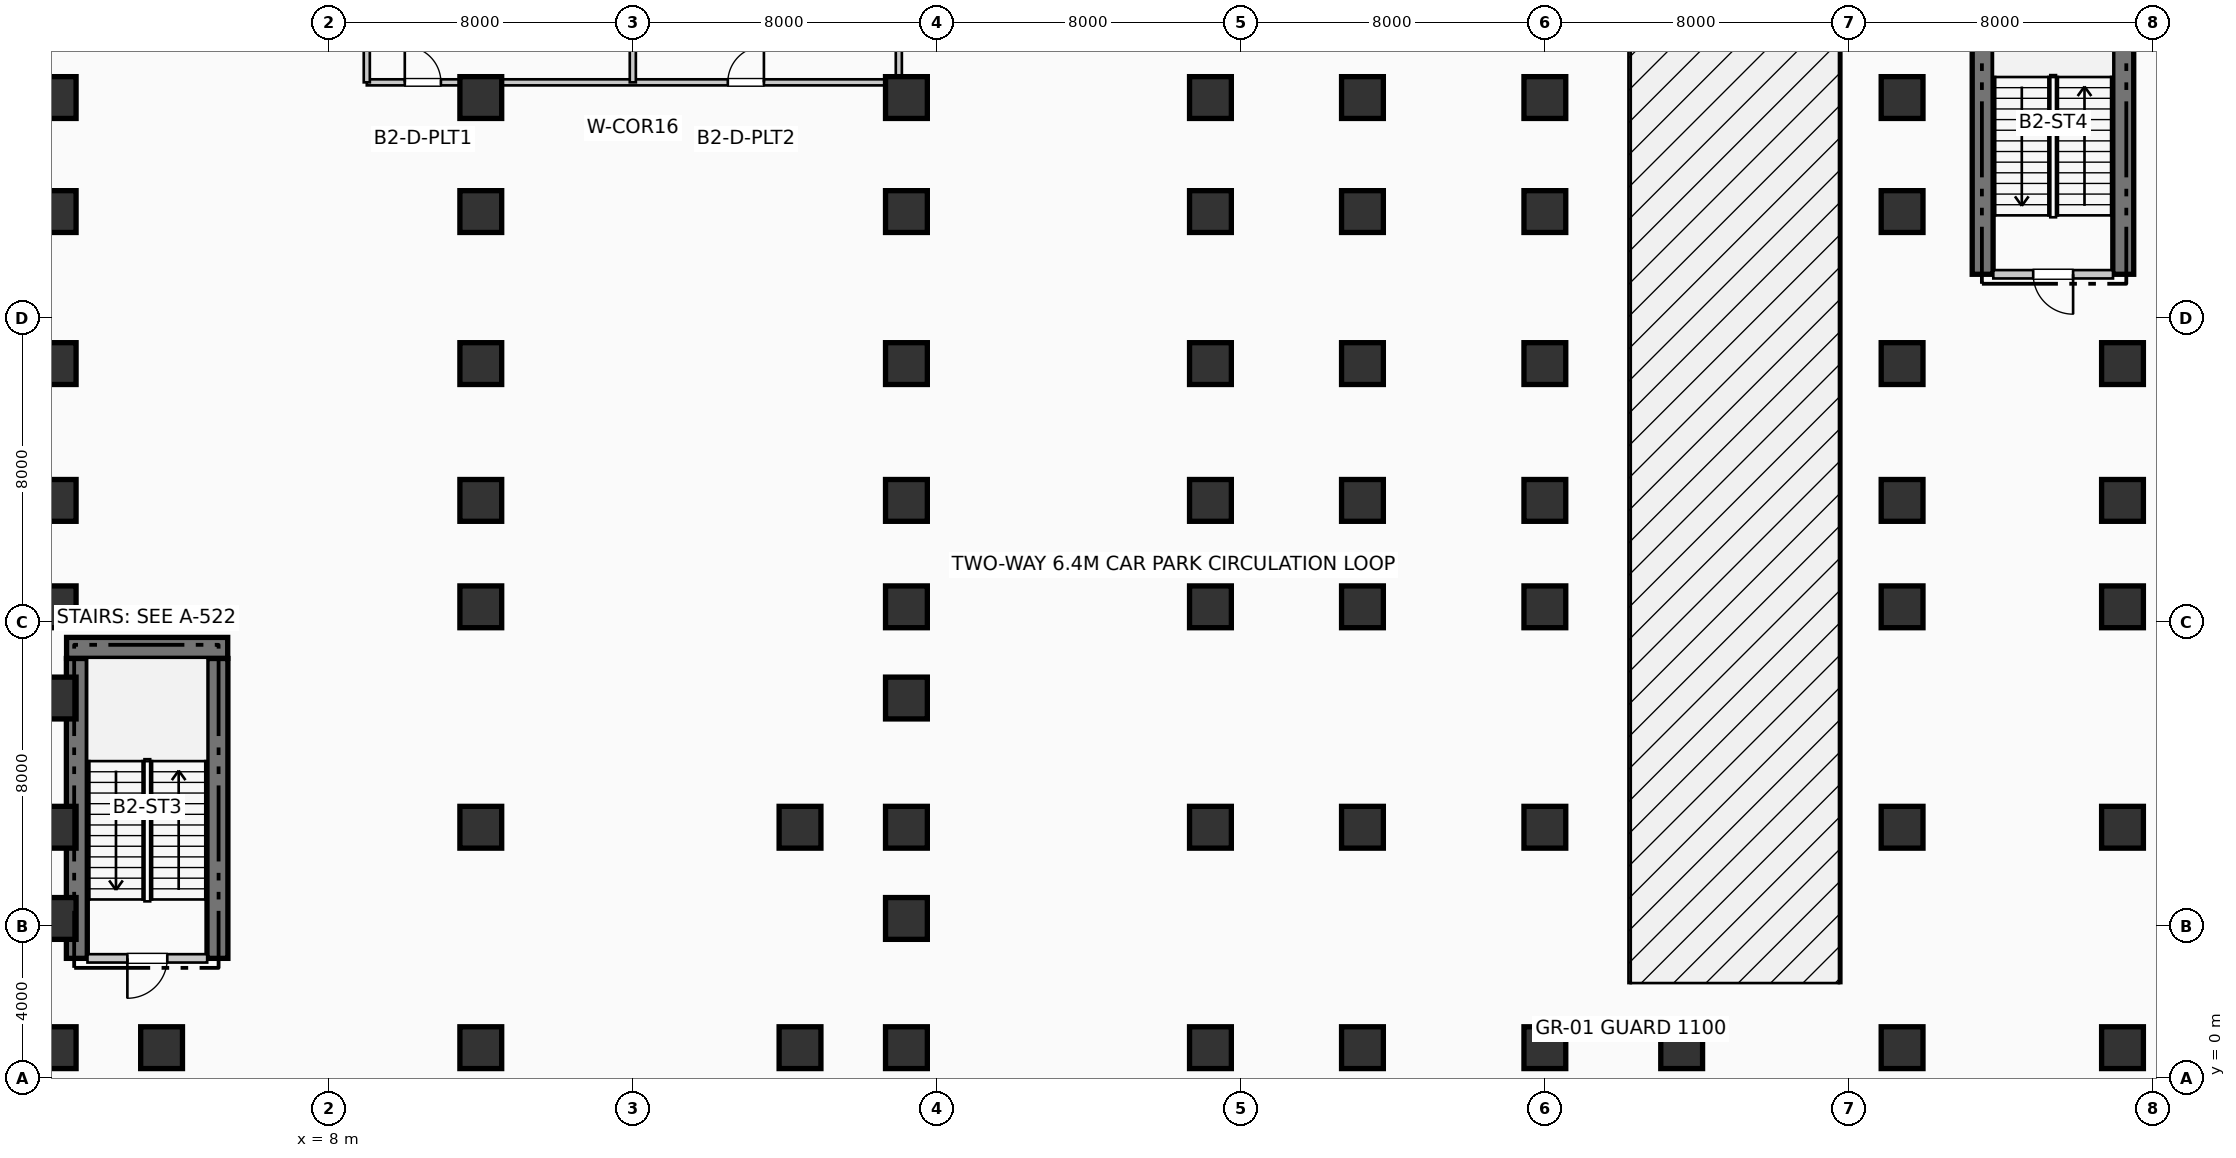
"""IFC4 building model, lengths in metres.
Left out: names, types, materials, properties, quantities, classifications, styles, units other than length and angle.
Written with IfcOpenShell. Run it as: python <this file> out.ifc"""

import sys

from ifc_helpers import new_model, si_unit, direction, frame, frame_2d, origin, origin_2d, place, context, subcontext, project, spatial, rectangle, extrude, element, fill, save


model = new_model("IFC4")
c1 = context("Model", 3, precision=1e-05, world=origin(), true_north=direction((0.0, 1.0)))
c2 = subcontext(c1, "Body", "Model", "MODEL_VIEW")
j1 = project(units=[si_unit("LENGTHUNIT", "METRE"), si_unit("PLANEANGLEUNIT", "RADIAN")], contexts=[c1])
p1 = place(None, origin())
s1 = spatial("IfcSite", under=j1, at=p1, CompositionType="ELEMENT")
p2 = place(p1, origin())
s2 = spatial("IfcBuilding", under=s1, at=p2, CompositionType="ELEMENT")
p3 = place(p2, frame((0.0, 0.0, -9.24)))
s3 = spatial("IfcBuildingStorey", under=s2, at=p3, CompositionType="ELEMENT", Elevation=-9.24)
for number, where, z_axis, x_axis in (
    (1, (1.37, 3.15, 0.0), (0.0, 0.0, 1.0), (0.0, 1.0, 0.0)),
    (2, (5.07, 3.15, 0.0), (0.0, 0.0, 1.0), (0.0, 1.0, 0.0)),
):
    element("IfcWall", number, at=place(p3, frame(where, z_axis=z_axis, x_axis=x_axis)), inside=s3, PredefinedType="SHEAR", context=c2, shape_type="SweptSolid", body=[
        extrude(rectangle(XDim=7.89, YDim=0.55, at=frame_2d((3.945, 0.0))), origin(), (0.0, 0.0, 1.0), 4.62),
    ])
p4 = place(p3, frame((1.1, 11.32, 0.0), z_axis=(0.0, 0.0, 1.0), x_axis=(1.0, 0.0, 0.0)))
e3 = element("IfcWall", 3, at=p4, inside=s3, PredefinedType="SHEAR", context=c2, shape_type="SweptSolid", body=[
    extrude(rectangle(XDim=4.24, YDim=0.55, at=frame_2d((2.12, 0.0))), origin(), (0.0, 0.0, 1.0), 4.62),
])
for number, where, z_axis, x_axis in (
    (4, (51.52, 21.15, 0.0), (0.0, 0.0, 1.0), (0.0, 1.0, 0.0)),
    (5, (55.22, 21.15, 0.0), (0.0, 0.0, 1.0), (0.0, 1.0, 0.0)),
):
    element("IfcWall", number, at=place(p3, frame(where, z_axis=z_axis, x_axis=x_axis)), inside=s3, PredefinedType="SHEAR", context=c2, shape_type="SweptSolid", body=[
        extrude(rectangle(XDim=7.89, YDim=0.55, at=frame_2d((3.945, 0.0))), origin(), (0.0, 0.0, 1.0), 4.62),
    ])
for number, where, z_axis, x_axis in (
    (6, (0.8, 0.8, 0.0), (0.0, 0.0, 1.0), (1.0, 0.0, 0.0)),
    (7, (0.8, 4.2, 0.0), (0.0, 0.0, 1.0), (1.0, 0.0, 0.0)),
    (8, (0.8, 6.6, 0.0), (0.0, 0.0, 1.0), (1.0, 0.0, 0.0)),
    (9, (0.8, 10.0, 0.0), (0.0, 0.0, 1.0), (1.0, 0.0, 0.0)),
    (10, (0.8, 12.4, 0.0), (0.0, 0.0, 1.0), (1.0, 0.0, 0.0)),
    (11, (0.8, 15.2, 0.0), (0.0, 0.0, 1.0), (1.0, 0.0, 0.0)),
    (12, (0.8, 18.8, 0.0), (0.0, 0.0, 1.0), (1.0, 0.0, 0.0)),
    (13, (0.8, 22.8, 0.0), (0.0, 0.0, 1.0), (1.0, 0.0, 0.0)),
    (14, (0.8, 25.8, 0.0), (0.0, 0.0, 1.0), (1.0, 0.0, 0.0)),
    (15, (3.6, 0.8, 0.0), (0.0, 0.0, 1.0), (1.0, 0.0, 0.0)),
    (16, (12.0, 0.8, 0.0), (0.0, 0.0, 1.0), (1.0, 0.0, 0.0)),
    (17, (12.0, 6.6, 0.0), (0.0, 0.0, 1.0), (1.0, 0.0, 0.0)),
    (18, (12.0, 12.4, 0.0), (0.0, 0.0, 1.0), (1.0, 0.0, 0.0)),
    (19, (12.0, 15.2, 0.0), (0.0, 0.0, 1.0), (1.0, 0.0, 0.0)),
    (20, (12.0, 18.8, 0.0), (0.0, 0.0, 1.0), (1.0, 0.0, 0.0)),
    (21, (12.0, 22.8, 0.0), (0.0, 0.0, 1.0), (1.0, 0.0, 0.0)),
    (22, (12.0, 25.8, 0.0), (0.0, 0.0, 1.0), (1.0, 0.0, 0.0)),
    (23, (20.4, 0.8, 0.0), (0.0, 0.0, 1.0), (1.0, 0.0, 0.0)),
    (24, (20.4, 6.6, 0.0), (0.0, 0.0, 1.0), (1.0, 0.0, 0.0)),
    (25, (23.2, 0.8, 0.0), (0.0, 0.0, 1.0), (1.0, 0.0, 0.0)),
    (26, (23.2, 4.2, 0.0), (0.0, 0.0, 1.0), (1.0, 0.0, 0.0)),
    (27, (23.2, 6.6, 0.0), (0.0, 0.0, 1.0), (1.0, 0.0, 0.0)),
    (28, (23.2, 10.0, 0.0), (0.0, 0.0, 1.0), (1.0, 0.0, 0.0)),
    (29, (23.2, 12.4, 0.0), (0.0, 0.0, 1.0), (1.0, 0.0, 0.0)),
    (30, (23.2, 15.2, 0.0), (0.0, 0.0, 1.0), (1.0, 0.0, 0.0)),
    (31, (23.2, 18.8, 0.0), (0.0, 0.0, 1.0), (1.0, 0.0, 0.0)),
    (32, (23.2, 22.8, 0.0), (0.0, 0.0, 1.0), (1.0, 0.0, 0.0)),
    (33, (23.2, 25.8, 0.0), (0.0, 0.0, 1.0), (1.0, 0.0, 0.0)),
    (34, (31.2, 0.8, 0.0), (0.0, 0.0, 1.0), (1.0, 0.0, 0.0)),
    (35, (31.2, 6.6, 0.0), (0.0, 0.0, 1.0), (1.0, 0.0, 0.0)),
    (36, (31.2, 12.4, 0.0), (0.0, 0.0, 1.0), (1.0, 0.0, 0.0)),
    (37, (31.2, 15.2, 0.0), (0.0, 0.0, 1.0), (1.0, 0.0, 0.0)),
    (38, (31.2, 18.8, 0.0), (0.0, 0.0, 1.0), (1.0, 0.0, 0.0)),
    (39, (31.2, 22.8, 0.0), (0.0, 0.0, 1.0), (1.0, 0.0, 0.0)),
    (40, (31.2, 25.8, 0.0), (0.0, 0.0, 1.0), (1.0, 0.0, 0.0)),
    (41, (35.2, 0.8, 0.0), (0.0, 0.0, 1.0), (1.0, 0.0, 0.0)),
    (42, (35.2, 6.6, 0.0), (0.0, 0.0, 1.0), (1.0, 0.0, 0.0)),
    (43, (35.2, 12.4, 0.0), (0.0, 0.0, 1.0), (1.0, 0.0, 0.0)),
    (44, (35.2, 15.2, 0.0), (0.0, 0.0, 1.0), (1.0, 0.0, 0.0)),
    (45, (35.2, 18.8, 0.0), (0.0, 0.0, 1.0), (1.0, 0.0, 0.0)),
    (46, (35.2, 22.8, 0.0), (0.0, 0.0, 1.0), (1.0, 0.0, 0.0)),
    (47, (35.2, 25.8, 0.0), (0.0, 0.0, 1.0), (1.0, 0.0, 0.0)),
    (48, (40.0, 0.8, 0.0), (0.0, 0.0, 1.0), (1.0, 0.0, 0.0)),
    (49, (40.0, 6.6, 0.0), (0.0, 0.0, 1.0), (1.0, 0.0, 0.0)),
    (50, (40.0, 12.4, 0.0), (0.0, 0.0, 1.0), (1.0, 0.0, 0.0)),
    (51, (40.0, 15.2, 0.0), (0.0, 0.0, 1.0), (1.0, 0.0, 0.0)),
    (52, (40.0, 18.8, 0.0), (0.0, 0.0, 1.0), (1.0, 0.0, 0.0)),
    (53, (40.0, 22.8, 0.0), (0.0, 0.0, 1.0), (1.0, 0.0, 0.0)),
    (54, (40.0, 25.8, 0.0), (0.0, 0.0, 1.0), (1.0, 0.0, 0.0)),
    (55, (43.6, 0.8, 0.0), (0.0, 0.0, 1.0), (1.0, 0.0, 0.0)),
    (56, (49.4, 0.8, 0.0), (0.0, 0.0, 1.0), (1.0, 0.0, 0.0)),
    (57, (49.4, 6.6, 0.0), (0.0, 0.0, 1.0), (1.0, 0.0, 0.0)),
    (58, (49.4, 12.4, 0.0), (0.0, 0.0, 1.0), (1.0, 0.0, 0.0)),
    (59, (49.4, 15.2, 0.0), (0.0, 0.0, 1.0), (1.0, 0.0, 0.0)),
    (60, (49.4, 18.8, 0.0), (0.0, 0.0, 1.0), (1.0, 0.0, 0.0)),
    (61, (49.4, 22.8, 0.0), (0.0, 0.0, 1.0), (1.0, 0.0, 0.0)),
    (62, (49.4, 25.8, 0.0), (0.0, 0.0, 1.0), (1.0, 0.0, 0.0)),
    (63, (55.2, 0.8, 0.0), (0.0, 0.0, 1.0), (1.0, 0.0, 0.0)),
    (64, (55.2, 6.6, 0.0), (0.0, 0.0, 1.0), (1.0, 0.0, 0.0)),
    (65, (55.2, 12.4, 0.0), (0.0, 0.0, 1.0), (1.0, 0.0, 0.0)),
    (66, (55.2, 15.2, 0.0), (0.0, 0.0, 1.0), (1.0, 0.0, 0.0)),
    (67, (55.2, 18.8, 0.0), (0.0, 0.0, 1.0), (1.0, 0.0, 0.0)),
):
    element("IfcColumn", number, at=place(p3, frame(where, z_axis=z_axis, x_axis=x_axis)), inside=s3, PredefinedType="COLUMN", context=c2, shape_type="SweptSolid", body=[
        extrude(rectangle(XDim=1.1, YDim=1.1, at=origin_2d()), origin(), (0.0, 0.0, 1.0), 4.62),
    ])
p5 = place(p3, frame((1.65, 3.15, 0.0), z_axis=(0.0, 0.0, 1.0), x_axis=(1.0, 0.0, 0.0)))
e68 = element("IfcWall", 68, at=p5, inside=s3, PredefinedType="PARTITIONING", context=c2, shape_type="SweptSolid", body=[
    extrude(rectangle(XDim=3.15, YDim=0.22, at=frame_2d((1.575, 0.0))), origin(), (0.0, 0.0, 1.0), 4.27),
])
p6 = place(p5, frame((2.1, 0.0, 0.0), z_axis=(0.0, 0.0, 1.0), x_axis=(-1.0, 0.0, 0.0)))
e69 = element("IfcOpeningElement", 69, at=p6, cuts=e68, PredefinedType="OPENING", context=c2, shape_type="SweptSolid", body=[
    extrude(rectangle(XDim=1.05, YDim=2.15, at=frame_2d((0.525, 1.075))), frame((0.0, 0.12, 0.0), z_axis=(0.0, -1.0, 0.0), x_axis=(1.0, 0.0, 0.0)), (0.0, 0.0, 1.0), 0.24),
])
p7 = place(p3, frame((51.8, 21.15, 0.0), z_axis=(0.0, 0.0, 1.0), x_axis=(1.0, 0.0, 0.0)))
e70 = element("IfcWall", 70, at=p7, inside=s3, PredefinedType="PARTITIONING", context=c2, shape_type="SweptSolid", body=[
    extrude(rectangle(XDim=3.15, YDim=0.22, at=frame_2d((1.575, 0.0))), origin(), (0.0, 0.0, 1.0), 4.27),
])
p8 = place(p7, frame((2.1, 0.0, 0.0), z_axis=(0.0, 0.0, 1.0), x_axis=(-1.0, 0.0, 0.0)))
e71 = element("IfcOpeningElement", 71, at=p8, cuts=e70, PredefinedType="OPENING", context=c2, shape_type="SweptSolid", body=[
    extrude(rectangle(XDim=1.05, YDim=2.15, at=frame_2d((0.525, 1.075))), frame((0.0, 0.12, 0.0), z_axis=(0.0, -1.0, 0.0), x_axis=(1.0, 0.0, 0.0)), (0.0, 0.0, 1.0), 0.24),
])
p9 = place(p3, frame((9.0, 26.2, 0.0), z_axis=(0.0, 0.0, 1.0), x_axis=(1.0, 0.0, 0.0)))
e72 = element("IfcWall", 72, at=p9, inside=s3, PredefinedType="PARTITIONING", context=c2, shape_type="SweptSolid", body=[
    extrude(rectangle(XDim=14.0, YDim=0.16, at=frame_2d((7.0, 0.0))), origin(), (0.0, 0.0, 1.0), 3.455),
])
p10 = place(p9, frame((1.0, 0.0, 0.0)))
e73 = element("IfcOpeningElement", 73, at=p10, cuts=e72, PredefinedType="OPENING", context=c2, shape_type="SweptSolid", body=[
    extrude(rectangle(XDim=0.95, YDim=2.1, at=frame_2d((0.475, 1.05))), frame((0.0, 0.09, 0.0), z_axis=(0.0, -1.0, 0.0), x_axis=(1.0, 0.0, 0.0)), (0.0, 0.0, 1.0), 0.18),
])
p11 = place(p9, frame((9.5, 0.0, 0.0)))
e74 = element("IfcOpeningElement", 74, at=p11, cuts=e72, PredefinedType="OPENING", context=c2, shape_type="SweptSolid", body=[
    extrude(rectangle(XDim=0.95, YDim=2.1, at=frame_2d((0.475, 1.05))), frame((0.0, 0.09, 0.0), z_axis=(0.0, -1.0, 0.0), x_axis=(1.0, 0.0, 0.0)), (0.0, 0.0, 1.0), 0.18),
])
p12 = place(p3, frame((9.0, 26.2, 0.0), z_axis=(0.0, 0.0, 1.0), x_axis=(0.0, 1.0, 0.0)))
e75 = element("IfcWall", 75, at=p12, inside=s3, PredefinedType="PARTITIONING", context=c2, shape_type="SweptSolid", body=[
    extrude(rectangle(XDim=5.5, YDim=0.16, at=frame_2d((2.75, 0.0))), origin(), (0.0, 0.0, 1.0), 4.27),
])
p13 = place(p3, frame((23.0, 26.2, 0.0), z_axis=(0.0, 0.0, 1.0), x_axis=(0.0, 1.0, 0.0)))
e76 = element("IfcWall", 76, at=p13, inside=s3, PredefinedType="PARTITIONING", context=c2, shape_type="SweptSolid", body=[
    extrude(rectangle(XDim=5.5, YDim=0.16, at=frame_2d((2.75, 0.0))), origin(), (0.0, 0.0, 1.0), 3.455),
])
p14 = place(p3, frame((16.0, 26.2, 0.0), z_axis=(0.0, 0.0, 1.0), x_axis=(0.0, 1.0, 0.0)))
e77 = element("IfcWall", 77, at=p14, inside=s3, PredefinedType="PARTITIONING", context=c2, shape_type="SweptSolid", body=[
    extrude(rectangle(XDim=5.5, YDim=0.16, at=frame_2d((2.75, 0.0))), origin(), (0.0, 0.0, 1.0), 4.27),
])
p15 = place(p6, origin())
e78 = element("IfcDoor", 78, at=p15, inside=s3, OperationType="SINGLE_SWING_LEFT", PredefinedType="DOOR", context=c2, shape_type="SweptSolid", body=[
    extrude(rectangle(XDim=1.05, YDim=2.15, at=frame_2d((0.525, 1.075))), frame((0.0, 0.025, 0.0), z_axis=(0.0, -1.0, 0.0), x_axis=(1.0, 0.0, 0.0)), (0.0, 0.0, 1.0), 0.05),
])
fill(e69, e78)
p16 = place(p8, origin())
e79 = element("IfcDoor", 79, at=p16, inside=s3, OperationType="SINGLE_SWING_RIGHT", PredefinedType="DOOR", context=c2, shape_type="SweptSolid", body=[
    extrude(rectangle(XDim=1.05, YDim=2.15, at=frame_2d((0.525, 1.075))), frame((0.0, 0.025, 0.0), z_axis=(0.0, -1.0, 0.0), x_axis=(1.0, 0.0, 0.0)), (0.0, 0.0, 1.0), 0.05),
])
fill(e71, e79)
p17 = place(p10, origin())
e80 = element("IfcDoor", 80, at=p17, inside=s3, OperationType="SINGLE_SWING_LEFT", PredefinedType="DOOR", context=c2, shape_type="SweptSolid", body=[
    extrude(rectangle(XDim=0.95, YDim=2.1, at=frame_2d((0.475, 1.05))), frame((0.0, 0.025, 0.0), z_axis=(0.0, -1.0, 0.0), x_axis=(1.0, 0.0, 0.0)), (0.0, 0.0, 1.0), 0.05),
])
fill(e73, e80)
p18 = place(p11, origin())
e81 = element("IfcDoor", 81, at=p18, inside=s3, OperationType="SINGLE_SWING_RIGHT", PredefinedType="DOOR", context=c2, shape_type="SweptSolid", body=[
    extrude(rectangle(XDim=0.95, YDim=2.1, at=frame_2d((0.475, 1.05))), frame((0.0, 0.025, 0.0), z_axis=(0.0, -1.0, 0.0), x_axis=(1.0, 0.0, 0.0)), (0.0, 0.0, 1.0), 0.05),
])
fill(e74, e81)
save(model, sys.argv[1])
